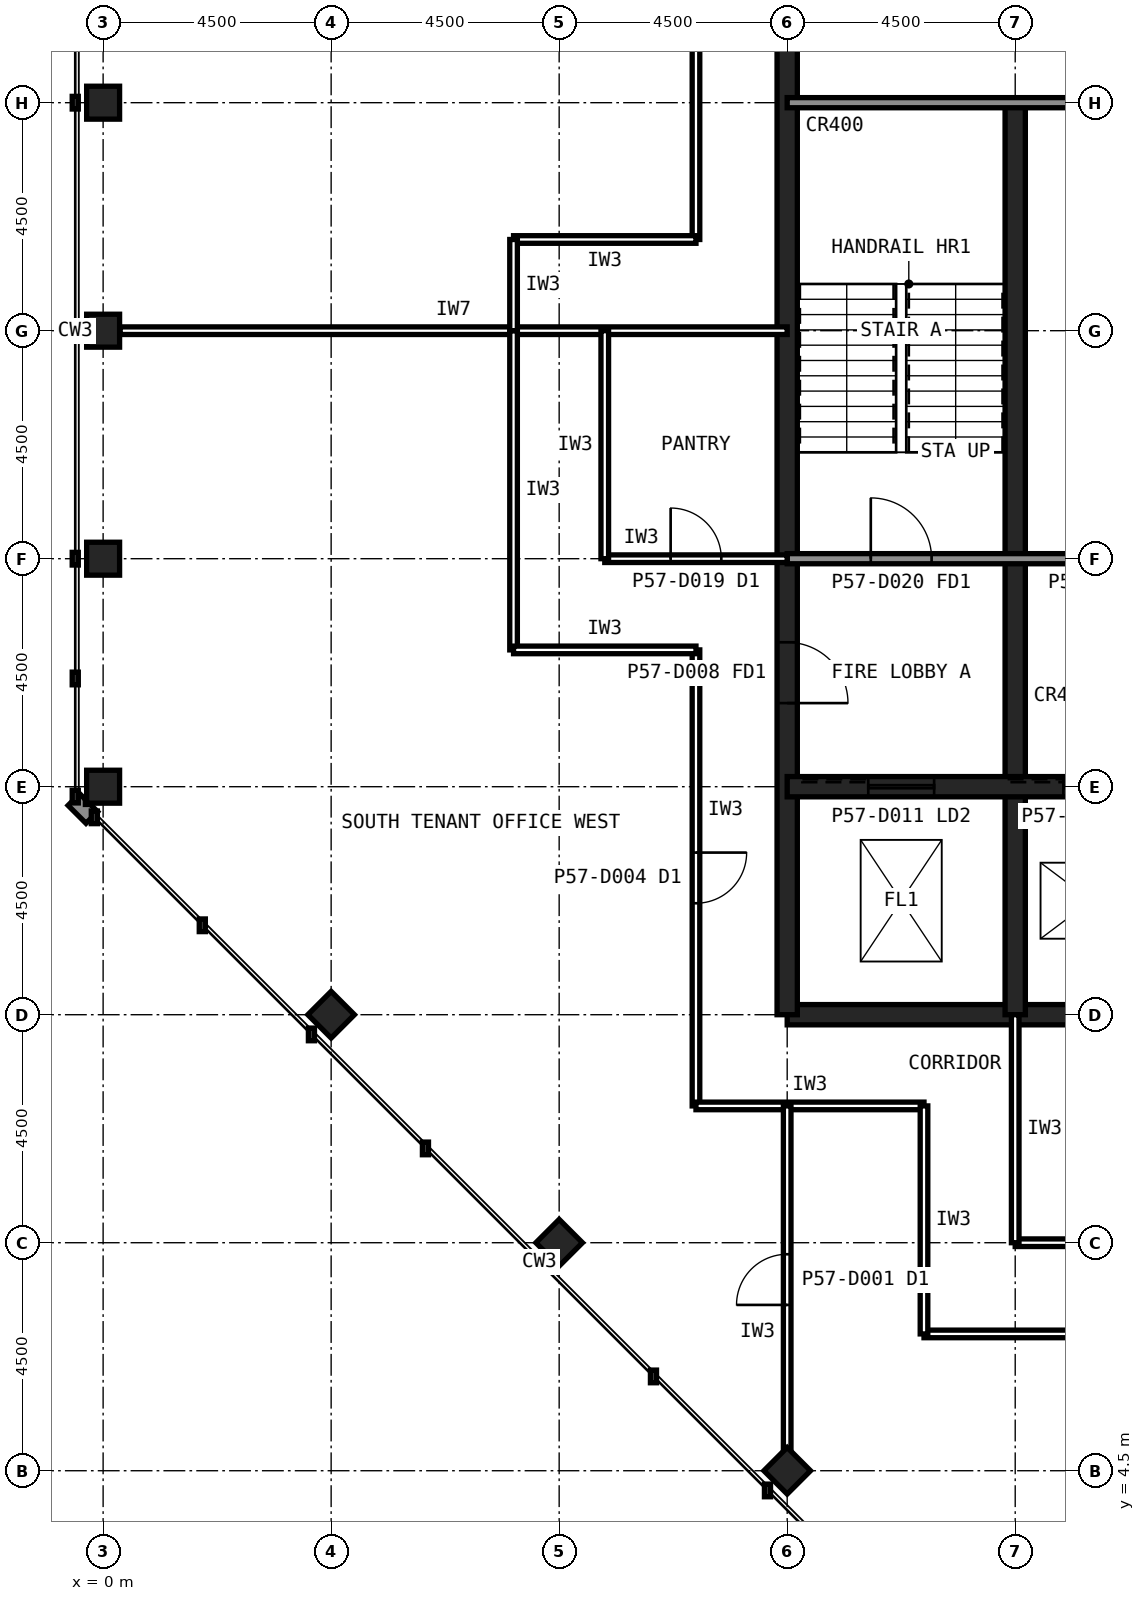
"""IFC4 building model, lengths in metres.
Left out: names, types, materials, properties, quantities, classifications, styles, units other than length and angle.
Written with IfcOpenShell. Run it as: python <this file> out.ifc"""

import sys

from ifc_helpers import new_model, si_unit, direction, frame, frame_2d, origin, origin_2d, place, context, subcontext, project, spatial, rectangle, hollow_rectangle, extrude, element, fill, save


model = new_model("IFC4")
c1 = context("Model", 3, precision=1e-05, world=origin(), true_north=direction((0.0, 1.0)))
c2 = subcontext(c1, "Body", "Model", "MODEL_VIEW")
j1 = project(units=[si_unit("LENGTHUNIT", "METRE"), si_unit("PLANEANGLEUNIT", "RADIAN")], contexts=[c1])
p1 = place(None, origin())
s1 = spatial("IfcSite", under=j1, at=p1, CompositionType="ELEMENT")
p2 = place(p1, origin())
s2 = spatial("IfcBuilding", under=s1, at=p2, CompositionType="ELEMENT")
p3 = place(p2, frame((0.0, 0.0, 238.6)))
s3 = spatial("IfcBuildingStorey", under=s2, at=p3, CompositionType="ELEMENT", Elevation=238.6)
for number, where, z_axis, x_axis in (
    (1, (0.0, 31.5, 0.0), (0.0, 0.0, 1.0), (1.0, 0.0, 0.0)),
    (2, (0.0, 27.0, 0.0), (0.0, 0.0, 1.0), (1.0, 0.0, 0.0)),
    (3, (0.0, 22.5, 0.0), (0.0, 0.0, 1.0), (1.0, 0.0, 0.0)),
    (4, (0.0, 18.0, 0.0), (0.0, 0.0, 1.0), (1.0, 0.0, 0.0)),
    (5, (13.5, 4.5, 0.0), (0.0, 0.0, 1.0), (0.707, 0.707, 0.0)),
    (6, (9.0, 9.0, 0.0), (0.0, 0.0, 1.0), (0.707, 0.707, 0.0)),
    (7, (4.5, 13.5, 0.0), (0.0, 0.0, 1.0), (0.707, 0.707, 0.0)),
):
    element("IfcColumn", number, at=place(p3, frame(where, z_axis=z_axis, x_axis=x_axis)), inside=s3, PredefinedType="COLUMN", context=c2, shape_type="SweptSolid", body=[
        extrude(hollow_rectangle(XDim=0.65, YDim=0.65, WallThickness=0.032, at=origin_2d()), origin(), (0.0, 0.0, 1.0), 4.0),
    ])
p4 = place(p3, frame((13.5, 13.5, 0.0), z_axis=(0.0, 0.0, 1.0), x_axis=(1.0, 0.0, 0.0)))
e8 = element("IfcWall", 8, at=p4, inside=s3, PredefinedType="SHEAR", context=c2, shape_type="SweptSolid", body=[
    extrude(rectangle(XDim=27.0, YDim=0.4, at=frame_2d((13.5, 0.0))), origin(), (0.0, 0.0, 1.0), 4.0),
])
p5 = place(p3, frame((13.5, 40.5, 0.0), z_axis=(0.0, 0.0, 1.0), x_axis=(0.0, -1.0, 0.0)))
e9 = element("IfcWall", 9, at=p5, inside=s3, PredefinedType="SHEAR", context=c2, shape_type="SweptSolid", body=[
    extrude(rectangle(XDim=27.0, YDim=0.4, at=frame_2d((13.5, 0.0))), origin(), (0.0, 0.0, 1.0), 4.0),
])
p6 = place(p5, frame((19.65, 0.0, 0.0)))
e10 = element("IfcOpeningElement", 10, at=p6, cuts=e9, PredefinedType="OPENING", context=c2, shape_type="SweptSolid", body=[
    extrude(rectangle(XDim=1.2, YDim=2.1, at=frame_2d((0.6, 1.05))), frame((0.0, 0.21, 0.0), z_axis=(0.0, -1.0, 0.0), x_axis=(1.0, 0.0, 0.0)), (0.0, 0.0, 1.0), 0.42),
])
p7 = place(p5, frame((5.85, 0.0, 0.0)))
e11 = element("IfcOpeningElement", 11, at=p7, cuts=e9, PredefinedType="OPENING", context=c2, shape_type="SweptSolid", body=[
    extrude(rectangle(XDim=1.8, YDim=2.1, at=frame_2d((0.9, 1.05))), frame((0.0, 0.21, 0.0), z_axis=(0.0, -1.0, 0.0), x_axis=(1.0, 0.0, 0.0)), (0.0, 0.0, 1.0), 0.42),
])
p8 = place(p3, frame((18.0, 13.5, 0.0), z_axis=(0.0, 0.0, 1.0), x_axis=(0.0, 1.0, 0.0)))
e12 = element("IfcWall", 12, at=p8, inside=s3, PredefinedType="SHEAR", context=c2, shape_type="SweptSolid", body=[
    extrude(rectangle(XDim=18.0, YDim=0.4, at=frame_2d((9.0, 0.0))), origin(), (0.0, 0.0, 1.0), 4.0),
])
p9 = place(p3, frame((13.5, 18.0, 0.0), z_axis=(0.0, 0.0, 1.0), x_axis=(1.0, 0.0, 0.0)))
e13 = element("IfcWall", 13, at=p9, inside=s3, PredefinedType="SHEAR", context=c2, shape_type="SweptSolid", body=[
    extrude(rectangle(XDim=27.0, YDim=0.4, at=frame_2d((13.5, 0.0))), origin(), (0.0, 0.0, 1.0), 4.0),
])
p10 = place(p9, frame((24.3, 0.0, 0.0)))
e14 = element("IfcOpeningElement", 14, at=p10, cuts=e13, PredefinedType="OPENING", context=c2, shape_type="SweptSolid", body=[
    extrude(rectangle(XDim=0.9, YDim=2.1, at=frame_2d((0.45, 1.05))), frame((0.0, 0.21, 0.0), z_axis=(0.0, -1.0, 0.0), x_axis=(1.0, 0.0, 0.0)), (0.0, 0.0, 1.0), 0.42),
])
p11 = place(p9, frame((5.45, 0.0, 0.0)))
e15 = element("IfcOpeningElement", 15, at=p11, cuts=e13, PredefinedType="OPENING", context=c2, shape_type="SweptSolid", body=[
    extrude(rectangle(XDim=1.1, YDim=2.1, at=frame_2d((0.55, 1.05))), frame((0.0, 0.21, 0.0), z_axis=(0.0, -1.0, 0.0), x_axis=(1.0, 0.0, 0.0)), (0.0, 0.0, 1.0), 0.42),
])
p12 = place(p9, frame((8.45, 0.0, 0.0)))
e16 = element("IfcOpeningElement", 16, at=p12, cuts=e13, PredefinedType="OPENING", context=c2, shape_type="SweptSolid", body=[
    extrude(rectangle(XDim=1.1, YDim=2.1, at=frame_2d((0.55, 1.05))), frame((0.0, 0.21, 0.0), z_axis=(0.0, -1.0, 0.0), x_axis=(1.0, 0.0, 0.0)), (0.0, 0.0, 1.0), 0.42),
])
p13 = place(p9, frame((11.45, 0.0, 0.0)))
e17 = element("IfcOpeningElement", 17, at=p13, cuts=e13, PredefinedType="OPENING", context=c2, shape_type="SweptSolid", body=[
    extrude(rectangle(XDim=1.1, YDim=2.1, at=frame_2d((0.55, 1.05))), frame((0.0, 0.21, 0.0), z_axis=(0.0, -1.0, 0.0), x_axis=(1.0, 0.0, 0.0)), (0.0, 0.0, 1.0), 0.42),
])
p14 = place(p9, frame((14.45, 0.0, 0.0)))
e18 = element("IfcOpeningElement", 18, at=p14, cuts=e13, PredefinedType="OPENING", context=c2, shape_type="SweptSolid", body=[
    extrude(rectangle(XDim=1.1, YDim=2.1, at=frame_2d((0.55, 1.05))), frame((0.0, 0.21, 0.0), z_axis=(0.0, -1.0, 0.0), x_axis=(1.0, 0.0, 0.0)), (0.0, 0.0, 1.0), 0.42),
])
p15 = place(p9, frame((17.45, 0.0, 0.0)))
e19 = element("IfcOpeningElement", 19, at=p15, cuts=e13, PredefinedType="OPENING", context=c2, shape_type="SweptSolid", body=[
    extrude(rectangle(XDim=1.1, YDim=2.1, at=frame_2d((0.55, 1.05))), frame((0.0, 0.21, 0.0), z_axis=(0.0, -1.0, 0.0), x_axis=(1.0, 0.0, 0.0)), (0.0, 0.0, 1.0), 0.42),
])
p16 = place(p9, frame((20.45, 0.0, 0.0)))
e20 = element("IfcOpeningElement", 20, at=p16, cuts=e13, PredefinedType="OPENING", context=c2, shape_type="SweptSolid", body=[
    extrude(rectangle(XDim=1.1, YDim=2.1, at=frame_2d((0.55, 1.05))), frame((0.0, 0.21, 0.0), z_axis=(0.0, -1.0, 0.0), x_axis=(1.0, 0.0, 0.0)), (0.0, 0.0, 1.0), 0.42),
])
p17 = place(p9, frame((1.6, 0.0, 0.0)))
e21 = element("IfcOpeningElement", 21, at=p17, cuts=e13, PredefinedType="OPENING", context=c2, shape_type="SweptSolid", body=[
    extrude(rectangle(XDim=1.3, YDim=2.2, at=frame_2d((0.65, 1.1))), frame((0.0, 0.21, 0.0), z_axis=(0.0, -1.0, 0.0), x_axis=(1.0, 0.0, 0.0)), (0.0, 0.0, 1.0), 0.42),
])
p18 = place(p3, frame((13.5, 22.5, 0.0), z_axis=(0.0, 0.0, 1.0), x_axis=(1.0, 0.0, 0.0)))
e22 = element("IfcWall", 22, at=p18, inside=s3, PredefinedType="SOLIDWALL", context=c2, shape_type="SweptSolid", body=[
    extrude(rectangle(XDim=27.0, YDim=0.2, at=frame_2d((13.5, 0.0))), origin(), (0.0, 0.0, 1.0), 3.84),
])
p19 = place(p18, frame((1.65, 0.0, 0.0)))
e23 = element("IfcOpeningElement", 23, at=p19, cuts=e22, PredefinedType="OPENING", context=c2, shape_type="SweptSolid", body=[
    extrude(rectangle(XDim=1.2, YDim=2.1, at=frame_2d((0.6, 1.05))), frame((0.0, 0.11, 0.0), z_axis=(0.0, -1.0, 0.0), x_axis=(1.0, 0.0, 0.0)), (0.0, 0.0, 1.0), 0.22),
])
p20 = place(p18, frame((6.025, 0.0, 0.0)))
e24 = element("IfcOpeningElement", 24, at=p20, cuts=e22, PredefinedType="OPENING", context=c2, shape_type="SweptSolid", body=[
    extrude(rectangle(XDim=1.0, YDim=2.1, at=frame_2d((0.5, 1.05))), frame((0.0, 0.11, 0.0), z_axis=(0.0, -1.0, 0.0), x_axis=(1.0, 0.0, 0.0)), (0.0, 0.0, 1.0), 0.22),
])
p21 = place(p18, frame((10.525, 0.0, 0.0)))
e25 = element("IfcOpeningElement", 25, at=p21, cuts=e22, PredefinedType="OPENING", context=c2, shape_type="SweptSolid", body=[
    extrude(rectangle(XDim=1.0, YDim=2.1, at=frame_2d((0.5, 1.05))), frame((0.0, 0.11, 0.0), z_axis=(0.0, -1.0, 0.0), x_axis=(1.0, 0.0, 0.0)), (0.0, 0.0, 1.0), 0.22),
])
p22 = place(p18, frame((19.75, 0.0, 0.0)))
e26 = element("IfcOpeningElement", 26, at=p22, cuts=e22, PredefinedType="OPENING", context=c2, shape_type="SweptSolid", body=[
    extrude(rectangle(XDim=1.0, YDim=2.1, at=frame_2d((0.5, 1.05))), frame((0.0, 0.11, 0.0), z_axis=(0.0, -1.0, 0.0), x_axis=(1.0, 0.0, 0.0)), (0.0, 0.0, 1.0), 0.22),
])
p23 = place(p18, frame((15.05, 0.0, 0.0)))
e27 = element("IfcOpeningElement", 27, at=p23, cuts=e22, PredefinedType="OPENING", context=c2, shape_type="SweptSolid", body=[
    extrude(rectangle(XDim=1.4, YDim=2.4, at=frame_2d((0.7, 1.2))), frame((0.0, 0.11, 0.0), z_axis=(0.0, -1.0, 0.0), x_axis=(1.0, 0.0, 0.0)), (0.0, 0.0, 1.0), 0.22),
])
p24 = place(p3, frame((13.5, 31.5, 0.0), z_axis=(0.0, 0.0, 1.0), x_axis=(1.0, 0.0, 0.0)))
e28 = element("IfcWall", 28, at=p24, inside=s3, PredefinedType="SOLIDWALL", context=c2, shape_type="SweptSolid", body=[
    extrude(rectangle(XDim=27.0, YDim=0.2, at=frame_2d((13.5, 0.0))), origin(), (0.0, 0.0, 1.0), 3.84),
])
p25 = place(p24, frame((24.15, 0.0, 0.0)))
e29 = element("IfcOpeningElement", 29, at=p25, cuts=e28, PredefinedType="OPENING", context=c2, shape_type="SweptSolid", body=[
    extrude(rectangle(XDim=1.2, YDim=2.1, at=frame_2d((0.6, 1.05))), frame((0.0, 0.11, 0.0), z_axis=(0.0, -1.0, 0.0), x_axis=(1.0, 0.0, 0.0)), (0.0, 0.0, 1.0), 0.22),
])
p26 = place(p24, frame((15.3, 0.0, 0.0)))
e30 = element("IfcOpeningElement", 30, at=p26, cuts=e28, PredefinedType="OPENING", context=c2, shape_type="SweptSolid", body=[
    extrude(rectangle(XDim=0.9, YDim=2.1, at=frame_2d((0.45, 1.05))), frame((0.0, 0.11, 0.0), z_axis=(0.0, -1.0, 0.0), x_axis=(1.0, 0.0, 0.0)), (0.0, 0.0, 1.0), 0.22),
])
p27 = place(p24, frame((19.8, 0.0, 0.0)))
e31 = element("IfcOpeningElement", 31, at=p27, cuts=e28, PredefinedType="OPENING", context=c2, shape_type="SweptSolid", body=[
    extrude(rectangle(XDim=0.9, YDim=2.1, at=frame_2d((0.45, 1.05))), frame((0.0, 0.11, 0.0), z_axis=(0.0, -1.0, 0.0), x_axis=(1.0, 0.0, 0.0)), (0.0, 0.0, 1.0), 0.22),
])
p28 = place(p3, frame((0.335, 27.0, 0.0), z_axis=(0.0, 0.0, 1.0), x_axis=(1.0, 0.0, 0.0)))
e32 = element("IfcWall", 32, at=p28, inside=s3, PredefinedType="PARTITIONING", context=c2, shape_type="SweptSolid", body=[
    extrude(rectangle(XDim=13.165, YDim=0.15, at=frame_2d((6.583, 0.0))), origin(), (0.0, 0.0, 1.0), 2.989),
])
p29 = place(p3, frame((16.2, 7.2, 0.0), z_axis=(0.0, 0.0, 1.0), x_axis=(1.0, 0.0, 0.0)))
e33 = element("IfcWall", 33, at=p29, inside=s3, PredefinedType="PARTITIONING", context=c2, shape_type="SweptSolid", body=[
    extrude(rectangle(XDim=12.6, YDim=0.15, at=frame_2d((6.3, 0.0))), origin(), (0.0, 0.0, 1.0), 3.84),
])
p30 = place(p3, frame((11.7, 20.7, 0.0), z_axis=(0.0, 0.0, 1.0), x_axis=(0.0, -1.0, 0.0)))
e34 = element("IfcWall", 34, at=p30, inside=s3, PredefinedType="PARTITIONING", context=c2, shape_type="SweptSolid", body=[
    extrude(rectangle(XDim=9.0, YDim=0.15, at=frame_2d((4.5, 0.0))), origin(), (0.0, 0.0, 1.0), 3.84),
])
p31 = place(p30, frame((4.0, 0.0, 0.0)))
e35 = element("IfcOpeningElement", 35, at=p31, cuts=e34, PredefinedType="OPENING", context=c2, shape_type="SweptSolid", body=[
    extrude(rectangle(XDim=1.0, YDim=2.1, at=frame_2d((0.5, 1.05))), frame((0.0, 0.085, 0.0), z_axis=(0.0, -1.0, 0.0), x_axis=(1.0, 0.0, 0.0)), (0.0, 0.0, 1.0), 0.17),
])
p32 = place(p3, frame((8.1, 27.0, 0.0), z_axis=(0.0, 0.0, 1.0), x_axis=(0.0, -1.0, 0.0)))
e36 = element("IfcWall", 36, at=p32, inside=s3, PredefinedType="PARTITIONING", context=c2, shape_type="SweptSolid", body=[
    extrude(rectangle(XDim=6.3, YDim=0.15, at=frame_2d((3.15, 0.0))), origin(), (0.0, 0.0, 1.0), 3.84),
])
for number, where, z_axis, x_axis in (
    (37, (11.7, 11.7, 0.0), (0.0, 0.0, 1.0), (1.0, 0.0, 0.0)),
    (38, (16.2, 11.7, 0.0), (0.0, 0.0, 1.0), (0.0, -1.0, 0.0)),
):
    element("IfcWall", number, at=place(p3, frame(where, z_axis=z_axis, x_axis=x_axis)), inside=s3, PredefinedType="PARTITIONING", context=c2, shape_type="SweptSolid", body=[
        extrude(rectangle(XDim=4.5, YDim=0.15, at=frame_2d((2.25, 0.0))), origin(), (0.0, 0.0, 1.0), 3.84),
    ])
p33 = place(p3, frame((8.1, 20.7, 0.0), z_axis=(0.0, 0.0, 1.0), x_axis=(1.0, 0.0, 0.0)))
e39 = element("IfcWall", 39, at=p33, inside=s3, PredefinedType="PARTITIONING", context=c2, shape_type="SweptSolid", body=[
    extrude(rectangle(XDim=3.6, YDim=0.15, at=frame_2d((1.8, 0.0))), origin(), (0.0, 0.0, 1.0), 3.84),
])
p34 = place(p3, frame((11.7, 42.3, 0.0), z_axis=(0.0, 0.0, 1.0), x_axis=(0.0, -1.0, 0.0)))
e40 = element("IfcWall", 40, at=p34, inside=s3, PredefinedType="PARTITIONING", context=c2, shape_type="SweptSolid", body=[
    extrude(rectangle(XDim=13.5, YDim=0.15, at=frame_2d((6.75, 0.0))), origin(), (0.0, 0.0, 1.0), 3.84),
])
p35 = place(p34, frame((6.25, 0.0, 0.0)))
e41 = element("IfcOpeningElement", 41, at=p35, cuts=e40, PredefinedType="OPENING", context=c2, shape_type="SweptSolid", body=[
    extrude(rectangle(XDim=1.0, YDim=2.1, at=frame_2d((0.5, 1.05))), frame((0.0, 0.085, 0.0), z_axis=(0.0, -1.0, 0.0), x_axis=(1.0, 0.0, 0.0)), (0.0, 0.0, 1.0), 0.17),
])
p36 = place(p3, frame((11.7, 28.8, 0.0), z_axis=(0.0, 0.0, 1.0), x_axis=(-1.0, 0.0, 0.0)))
e42 = element("IfcWall", 42, at=p36, inside=s3, PredefinedType="PARTITIONING", context=c2, shape_type="SweptSolid", body=[
    extrude(rectangle(XDim=3.6, YDim=0.15, at=frame_2d((1.8, 0.0))), origin(), (0.0, 0.0, 1.0), 3.84),
])
p37 = place(p3, frame((8.1, 28.8, 0.0), z_axis=(0.0, 0.0, 1.0), x_axis=(0.0, -1.0, 0.0)))
e43 = element("IfcWall", 43, at=p37, inside=s3, PredefinedType="PARTITIONING", context=c2, shape_type="SweptSolid", body=[
    extrude(rectangle(XDim=1.8, YDim=0.15, at=frame_2d((0.9, 0.0))), origin(), (0.0, 0.0, 1.0), 3.84),
])
p38 = place(p3, frame((18.0, 9.0, 0.0), z_axis=(0.0, 0.0, 1.0), x_axis=(1.0, 0.0, 0.0)))
e44 = element("IfcWall", 44, at=p38, inside=s3, PredefinedType="PARTITIONING", context=c2, shape_type="SweptSolid", body=[
    extrude(rectangle(XDim=9.0, YDim=0.15, at=frame_2d((4.5, 0.0))), origin(), (0.0, 0.0, 1.0), 3.84),
])
p39 = place(p3, frame((18.0, 13.5, 0.0), z_axis=(0.0, 0.0, 1.0), x_axis=(0.0, -1.0, 0.0)))
e45 = element("IfcWall", 45, at=p39, inside=s3, PredefinedType="PARTITIONING", context=c2, shape_type="SweptSolid", body=[
    extrude(rectangle(XDim=4.5, YDim=0.15, at=frame_2d((2.25, 0.0))), origin(), (0.0, 0.0, 1.0), 2.989),
])
p40 = place(p3, frame((9.9, 22.5, 0.0), z_axis=(0.0, 0.0, 1.0), x_axis=(1.0, 0.0, 0.0)))
e46 = element("IfcWall", 46, at=p40, inside=s3, PredefinedType="PARTITIONING", context=c2, shape_type="SweptSolid", body=[
    extrude(rectangle(XDim=3.6, YDim=0.15, at=frame_2d((1.8, 0.0))), origin(), (0.0, 0.0, 1.0), 2.989),
])
p41 = place(p40, frame((1.3, 0.0, 0.0)))
e47 = element("IfcOpeningElement", 47, at=p41, cuts=e46, PredefinedType="OPENING", context=c2, shape_type="SweptSolid", body=[
    extrude(rectangle(XDim=1.0, YDim=2.1, at=frame_2d((0.5, 1.05))), frame((0.0, 0.085, 0.0), z_axis=(0.0, -1.0, 0.0), x_axis=(1.0, 0.0, 0.0)), (0.0, 0.0, 1.0), 0.17),
])
p42 = place(p3, frame((9.9, 27.0, 0.0), z_axis=(0.0, 0.0, 1.0), x_axis=(0.0, -1.0, 0.0)))
e48 = element("IfcWall", 48, at=p42, inside=s3, PredefinedType="PARTITIONING", context=c2, shape_type="SweptSolid", body=[
    extrude(rectangle(XDim=4.5, YDim=0.15, at=frame_2d((2.25, 0.0))), origin(), (0.0, 0.0, 1.0), 3.84),
])
p43 = place(p3, frame((13.5, 4.845, 0.0), z_axis=(0.0, 0.0, 1.0), x_axis=(0.0, 1.0, 0.0)))
e49 = element("IfcWall", 49, at=p43, inside=s3, PredefinedType="PARTITIONING", context=c2, shape_type="SweptSolid", body=[
    extrude(rectangle(XDim=6.855, YDim=0.15, at=frame_2d((3.427, 0.0))), origin(), (0.0, 0.0, 1.0), 2.989),
])
p44 = place(p43, frame((2.927, 0.0, 0.0)))
e50 = element("IfcOpeningElement", 50, at=p44, cuts=e49, PredefinedType="OPENING", context=c2, shape_type="SweptSolid", body=[
    extrude(rectangle(XDim=1.0, YDim=2.1, at=frame_2d((0.5, 1.05))), frame((0.0, 0.085, 0.0), z_axis=(0.0, -1.0, 0.0), x_axis=(1.0, 0.0, 0.0)), (0.0, 0.0, 1.0), 0.17),
])
p45 = place(p6, origin())
e51 = element("IfcDoor", 51, at=p45, inside=s3, OperationType="SINGLE_SWING_RIGHT", PredefinedType="DOOR", context=c2, shape_type="SweptSolid", body=[
    extrude(rectangle(XDim=1.2, YDim=2.1, at=frame_2d((0.6, 1.05))), frame((0.0, 0.025, 0.0), z_axis=(0.0, -1.0, 0.0), x_axis=(1.0, 0.0, 0.0)), (0.0, 0.0, 1.0), 0.05),
])
fill(e10, e51)
p46 = place(p19, origin())
e52 = element("IfcDoor", 52, at=p46, inside=s3, OperationType="SINGLE_SWING_LEFT", PredefinedType="DOOR", context=c2, shape_type="SweptSolid", body=[
    extrude(rectangle(XDim=1.2, YDim=2.1, at=frame_2d((0.6, 1.05))), frame((0.0, 0.025, 0.0), z_axis=(0.0, -1.0, 0.0), x_axis=(1.0, 0.0, 0.0)), (0.0, 0.0, 1.0), 0.05),
])
fill(e23, e52)
p47 = place(p11, origin())
e53 = element("IfcDoor", 53, at=p47, inside=s3, OperationType="SLIDING_TO_LEFT", PredefinedType="DOOR", context=c2, shape_type="SweptSolid", body=[
    extrude(rectangle(XDim=1.1, YDim=2.1, at=frame_2d((0.55, 1.05))), frame((0.0, 0.025, 0.0), z_axis=(0.0, -1.0, 0.0), x_axis=(1.0, 0.0, 0.0)), (0.0, 0.0, 1.0), 0.05),
])
fill(e15, e53)
p48 = place(p17, origin())
e54 = element("IfcDoor", 54, at=p48, inside=s3, OperationType="SLIDING_TO_LEFT", PredefinedType="DOOR", context=c2, shape_type="SweptSolid", body=[
    extrude(rectangle(XDim=1.3, YDim=2.2, at=frame_2d((0.65, 1.1))), frame((0.0, 0.025, 0.0), z_axis=(0.0, -1.0, 0.0), x_axis=(1.0, 0.0, 0.0)), (0.0, 0.0, 1.0), 0.05),
])
fill(e21, e54)
p49 = place(p31, origin())
e55 = element("IfcDoor", 55, at=p49, inside=s3, OperationType="SINGLE_SWING_LEFT", PredefinedType="DOOR", context=c2, shape_type="SweptSolid", body=[
    extrude(rectangle(XDim=1.0, YDim=2.1, at=frame_2d((0.5, 1.05))), frame((0.0, 0.025, 0.0), z_axis=(0.0, -1.0, 0.0), x_axis=(1.0, 0.0, 0.0)), (0.0, 0.0, 1.0), 0.05),
])
fill(e35, e55)
p50 = place(p41, origin())
e56 = element("IfcDoor", 56, at=p50, inside=s3, OperationType="SINGLE_SWING_LEFT", PredefinedType="DOOR", context=c2, shape_type="SweptSolid", body=[
    extrude(rectangle(XDim=1.0, YDim=2.1, at=frame_2d((0.5, 1.05))), frame((0.0, 0.025, 0.0), z_axis=(0.0, -1.0, 0.0), x_axis=(1.0, 0.0, 0.0)), (0.0, 0.0, 1.0), 0.05),
])
fill(e47, e56)
p51 = place(p44, origin())
e57 = element("IfcDoor", 57, at=p51, inside=s3, OperationType="SINGLE_SWING_LEFT", PredefinedType="DOOR", context=c2, shape_type="SweptSolid", body=[
    extrude(rectangle(XDim=1.0, YDim=2.1, at=frame_2d((0.5, 1.05))), frame((0.0, 0.025, 0.0), z_axis=(0.0, -1.0, 0.0), x_axis=(1.0, 0.0, 0.0)), (0.0, 0.0, 1.0), 0.05),
])
fill(e50, e57)
save(model, sys.argv[1])
